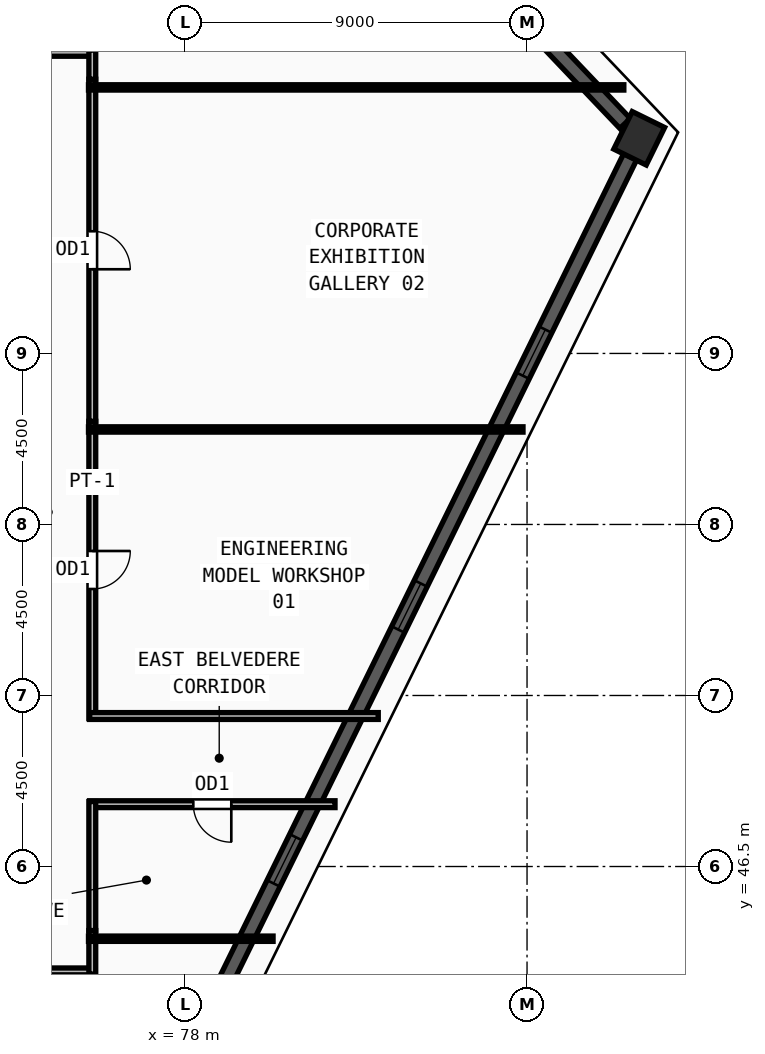
"""IFC4 building model, lengths in metres.
Left out: names, types, materials, properties, quantities, classifications, styles, units other than length and angle.
Written with IfcOpenShell. Run it as: python <this file> out.ifc"""

import sys

from ifc_helpers import new_model, si_unit, direction, frame, frame_2d, origin, origin_2d, place, context, subcontext, project, spatial, rectangle, extrude, source, transform, mapped, element, fill, save


model = new_model("IFC4")
c1 = context("Model", 3, precision=1e-05, world=origin(), true_north=direction((0.0, 1.0)))
c2 = subcontext(c1, "Body", "Model", "MODEL_VIEW")
j1 = project(units=[si_unit("LENGTHUNIT", "METRE"), si_unit("PLANEANGLEUNIT", "RADIAN")], contexts=[c1])
p1 = place(None, origin())
s1 = spatial("IfcSite", under=j1, at=p1, CompositionType="ELEMENT")
p2 = place(p1, origin())
s2 = spatial("IfcBuilding", under=s1, at=p2, CompositionType="ELEMENT")
p3 = place(p2, frame((0.0, 0.0, 309.0)))
s3 = spatial("IfcBuildingStorey", under=s2, at=p3, CompositionType="ELEMENT", Elevation=309.0)
m1 = source(origin(), c2, "Body", "SweptSolid", [
    extrude(rectangle(XDim=1.1, YDim=0.95, at=origin_2d()), origin(), (0.0, 0.0, 1.0), 3.75),
])
p4 = place(p3, frame((89.952, 65.661, 0.0), z_axis=(0.0, 0.0, 1.0), x_axis=(0.440566004113, 0.897720221461, 0.0)))
e1 = element("IfcColumn", 1, at=p4, inside=s3, PredefinedType="COLUMN", context=c2, shape_type="MappedRepresentation", body=[
    mapped(m1, transform((0.0, 0.0, 0.0), x_axis=(1.0, 0.0, 0.0), y_axis=(0.0, 1.0, 0.0), z_axis=(0.0, 0.0, 1.0), scale=1.0)),
])
p5 = place(p3, frame((78.098, 41.507, 0.0), z_axis=(0.0, 0.0, 1.0), x_axis=(0.440578765421, 0.897713958597, 0.0)))
e2 = element("IfcWall", 2, at=p5, inside=s3, PredefinedType="SOLIDWALL", context=c2, shape_type="SweptSolid", body=[
    extrude(rectangle(XDim=26.366, YDim=0.38, at=frame_2d((13.183, 0.0))), origin(), (0.0, 0.0, 1.0), 3.57),
])
m2 = source(origin(), c2, "Body", "SweptSolid", [
    extrude(rectangle(XDim=1.35, YDim=1.85, at=frame_2d((0.675, 0.925))), frame((0.0, 0.2, 0.0), z_axis=(0.0, -1.0, 0.0), x_axis=(1.0, 0.0, 0.0)), (0.0, 0.0, 1.0), 0.4),
])
p6 = place(p5, frame((5.066, 0.0, 0.55)))
e3 = element("IfcOpeningElement", 3, at=p6, cuts=e2, PredefinedType="OPENING", context=c2, shape_type="MappedRepresentation", body=[
    mapped(m2, transform((0.0, 0.0, 0.0), x_axis=(1.0, 0.0, 0.0), y_axis=(0.0, 1.0, 0.0), z_axis=(0.0, 0.0, 1.0), scale=1.0)),
])
p7 = place(p5, frame((12.508, 0.0, 0.55)))
e4 = element("IfcOpeningElement", 4, at=p7, cuts=e2, PredefinedType="OPENING", context=c2, shape_type="MappedRepresentation", body=[
    mapped(m2, transform((0.0, 0.0, 0.0), x_axis=(1.0, 0.0, 0.0), y_axis=(0.0, 1.0, 0.0), z_axis=(0.0, 0.0, 1.0), scale=1.0)),
])
p8 = place(p5, frame((19.949, 0.0, 0.55)))
e5 = element("IfcOpeningElement", 5, at=p8, cuts=e2, PredefinedType="OPENING", context=c2, shape_type="MappedRepresentation", body=[
    mapped(m2, transform((0.0, 0.0, 0.0), x_axis=(1.0, 0.0, 0.0), y_axis=(0.0, 1.0, 0.0), z_axis=(0.0, 0.0, 1.0), scale=1.0)),
])
p9 = place(p3, frame((89.58, 66.052, 0.0), z_axis=(0.0, 0.0, 1.0), x_axis=(-0.689378051653, 0.724401754484, 0.0)))
e6 = element("IfcWall", 6, at=p9, inside=s3, PredefinedType="SOLIDWALL", context=c2, shape_type="SweptSolid", body=[
    extrude(rectangle(XDim=3.938, YDim=0.38, at=frame_2d((1.969, 0.0))), origin(), (0.0, 0.0, 1.0), 3.57),
])
p10 = place(p3, frame((75.56, 58.215, 0.0), z_axis=(0.0, 0.0, 1.0), x_axis=(0.0, -1.0, 0.0)))
e7 = element("IfcWall", 7, at=p10, inside=s3, PredefinedType="PARTITIONING", context=c2, shape_type="SweptSolid", body=[
    extrude(rectangle(XDim=7.825, YDim=0.18, at=frame_2d((3.913, 0.0))), origin(), (0.0, 0.0, 1.0), 3.57),
])
m3 = source(origin(), c2, "Body", "SweptSolid", [
    extrude(rectangle(XDim=1.0, YDim=2.2, at=frame_2d((0.5, 1.1))), frame((0.0, 0.1, 0.0), z_axis=(0.0, -1.0, 0.0), x_axis=(1.0, 0.0, 0.0)), (0.0, 0.0, 1.0), 0.2),
])
p11 = place(p10, frame((3.413, 0.0, 0.0)))
e8 = element("IfcOpeningElement", 8, at=p11, cuts=e7, PredefinedType="OPENING", context=c2, shape_type="MappedRepresentation", body=[
    mapped(m3, transform((0.0, 0.0, 0.0), x_axis=(1.0, 0.0, 0.0), y_axis=(0.0, 1.0, 0.0), z_axis=(0.0, 0.0, 1.0), scale=1.0)),
])
p12 = place(p3, frame((75.56, 67.215, 0.0), z_axis=(0.0, 0.0, 1.0), x_axis=(0.0, -1.0, 0.0)))
e9 = element("IfcWall", 9, at=p12, inside=s3, PredefinedType="PARTITIONING", context=c2, shape_type="SweptSolid", body=[
    extrude(rectangle(XDim=9.0, YDim=0.18, at=frame_2d((4.5, 0.0))), origin(), (0.0, 0.0, 1.0), 3.57),
])
p13 = place(p12, frame((4.0, 0.0, 0.0)))
e10 = element("IfcOpeningElement", 10, at=p13, cuts=e9, PredefinedType="OPENING", context=c2, shape_type="MappedRepresentation", body=[
    mapped(m3, transform((0.0, 0.0, 0.0), x_axis=(1.0, 0.0, 0.0), y_axis=(0.0, 1.0, 0.0), z_axis=(0.0, 0.0, 1.0), scale=1.0)),
])
p14 = place(p3, frame((54.19, 67.91, 0.0), z_axis=(0.0, 0.0, 1.0), x_axis=(1.0, 0.0, 0.0)))
e11 = element("IfcWall", 11, at=p14, inside=s3, PredefinedType="PARTITIONING", context=c2, shape_type="SweptSolid", body=[
    extrude(rectangle(XDim=21.44, YDim=0.18, at=frame_2d((10.72, 0.0))), origin(), (0.0, 0.0, 1.0), 3.261),
])
m4 = source(origin(), c2, "Body", "SweptSolid", [
    extrude(rectangle(XDim=1.5, YDim=2.2, at=frame_2d((0.75, 1.1))), frame((0.0, 0.1, 0.0), z_axis=(0.0, -1.0, 0.0), x_axis=(1.0, 0.0, 0.0)), (0.0, 0.0, 1.0), 0.2),
])
p15 = place(p14, frame((9.97, 0.0, 0.0)))
e12 = element("IfcOpeningElement", 12, at=p15, cuts=e11, PredefinedType="OPENING", context=c2, shape_type="MappedRepresentation", body=[
    mapped(m4, transform((0.0, 0.0, 0.0), x_axis=(1.0, 0.0, 0.0), y_axis=(0.0, 1.0, 0.0), z_axis=(0.0, 0.0, 1.0), scale=1.0)),
])
p16 = place(p3, frame((75.63, 43.74, 0.0), z_axis=(0.0, 0.0, 1.0), x_axis=(-1.0, 0.0, 0.0)))
e13 = element("IfcWall", 13, at=p16, inside=s3, PredefinedType="PARTITIONING", context=c2, shape_type="SweptSolid", body=[
    extrude(rectangle(XDim=20.415, YDim=0.18, at=frame_2d((10.208, 0.0))), origin(), (0.0, 0.0, 1.0), 3.57),
])
p17 = place(p16, frame((9.457, 0.0, 0.0)))
e14 = element("IfcOpeningElement", 14, at=p17, cuts=e13, PredefinedType="OPENING", context=c2, shape_type="MappedRepresentation", body=[
    mapped(m4, transform((0.0, 0.0, 0.0), x_axis=(1.0, 0.0, 0.0), y_axis=(0.0, 1.0, 0.0), z_axis=(0.0, 0.0, 1.0), scale=1.0)),
])
p18 = place(p3, frame((81.947, 48.14, 0.0), z_axis=(0.0, 0.0, 1.0), x_axis=(-1.0, 0.0, 0.0)))
e15 = element("IfcWall", 15, at=p18, inside=s3, PredefinedType="PARTITIONING", context=c2, shape_type="SweptSolid", body=[
    extrude(rectangle(XDim=6.457, YDim=0.18, at=frame_2d((3.229, 0.0))), origin(), (0.0, 0.0, 1.0), 3.57),
])
p19 = place(p18, frame((2.729, 0.0, 0.0)))
e16 = element("IfcOpeningElement", 16, at=p19, cuts=e15, PredefinedType="OPENING", context=c2, shape_type="MappedRepresentation", body=[
    mapped(m3, transform((0.0, 0.0, 0.0), x_axis=(1.0, 0.0, 0.0), y_axis=(0.0, 1.0, 0.0), z_axis=(0.0, 0.0, 1.0), scale=1.0)),
])
p20 = place(p3, frame((75.49, 50.46, 0.0), z_axis=(0.0, 0.0, 1.0), x_axis=(1.0, 0.0, 0.0)))
e17 = element("IfcWall", 17, at=p20, inside=s3, PredefinedType="PARTITIONING", context=c2, shape_type="SweptSolid", body=[
    extrude(rectangle(XDim=7.595, YDim=0.18, at=frame_2d((3.797, 0.0))), origin(), (0.0, 0.0, 1.0), 3.57),
])
p21 = place(p3, frame((75.56, 67.98, 0.0), z_axis=(0.0, 0.0, 1.0), x_axis=(0.0, -1.0, 0.0)))
e18 = element("IfcWall", 18, at=p21, inside=s3, PredefinedType="PARTITIONING", context=c2, shape_type="SweptSolid", body=[
    extrude(rectangle(XDim=0.765, YDim=0.18, at=frame_2d((0.382, 0.0))), origin(), (0.0, 0.0, 1.0), 3.57),
])
p22 = place(p3, frame((75.56, 44.815, 0.0), z_axis=(0.0, 0.0, 1.0), x_axis=(0.0, -1.0, 0.0)))
e19 = element("IfcWall", 19, at=p22, inside=s3, PredefinedType="PARTITIONING", context=c2, shape_type="SweptSolid", body=[
    extrude(rectangle(XDim=1.145, YDim=0.18, at=frame_2d((0.573, 0.0))), origin(), (0.0, 0.0, 1.0), 3.57),
])
p23 = place(p3, frame((75.56, 48.21, 0.0), z_axis=(0.0, 0.0, 1.0), x_axis=(0.0, -1.0, 0.0)))
e20 = element("IfcWall", 20, at=p23, inside=s3, PredefinedType="PARTITIONING", context=c2, shape_type="SweptSolid", body=[
    extrude(rectangle(XDim=3.395, YDim=0.18, at=frame_2d((1.698, 0.0))), origin(), (0.0, 0.0, 1.0), 3.57),
])
p24 = place(p3, frame((75.46, 44.6, 0.0), z_axis=(0.0, 0.0, 1.0), x_axis=(1.0, 0.0, 0.0)))
e21 = element("IfcWall", 21, at=p24, inside=s3, PredefinedType="PARTITIONING", context=c2, shape_type="SweptSolid", body=[
    extrude(rectangle(XDim=4.857, YDim=0.14, at=frame_2d((2.428, 0.0))), origin(), (0.0, 0.0, 1.0), 3.57),
])
p25 = place(p3, frame((75.46, 58.0, 0.0), z_axis=(0.0, 0.0, 1.0), x_axis=(1.0, 0.0, 0.0)))
e22 = element("IfcWall", 22, at=p25, inside=s3, PredefinedType="PARTITIONING", context=c2, shape_type="SweptSolid", body=[
    extrude(rectangle(XDim=11.434, YDim=0.14, at=frame_2d((5.717, 0.0))), origin(), (0.0, 0.0, 1.0), 3.57),
])
p26 = place(p3, frame((75.46, 67.0, 0.0), z_axis=(0.0, 0.0, 1.0), x_axis=(1.0, 0.0, 0.0)))
e23 = element("IfcWall", 23, at=p26, inside=s3, PredefinedType="PARTITIONING", context=c2, shape_type="SweptSolid", body=[
    extrude(rectangle(XDim=14.087, YDim=0.14, at=frame_2d((7.043, 0.0))), origin(), (0.0, 0.0, 1.0), 3.261),
])
m5 = source(origin(), c2, "Body", "SweptSolid", [
    extrude(rectangle(XDim=1.35, YDim=1.85, at=frame_2d((0.675, 0.925))), frame((0.0, 0.03, 0.0), z_axis=(0.0, -1.0, 0.0), x_axis=(1.0, 0.0, 0.0)), (0.0, 0.0, 1.0), 0.06),
])
p27 = place(p6, origin())
e24 = element("IfcWindow", 24, at=p27, inside=s3, PartitioningType="SINGLE_PANEL", PredefinedType="WINDOW", context=c2, shape_type="MappedRepresentation", body=[
    mapped(m5, transform((0.0, 0.0, 0.0), x_axis=(1.0, 0.0, 0.0), y_axis=(0.0, 1.0, 0.0), z_axis=(0.0, 0.0, 1.0), scale=1.0)),
])
fill(e3, e24)
p28 = place(p7, origin())
e25 = element("IfcWindow", 25, at=p28, inside=s3, PartitioningType="SINGLE_PANEL", PredefinedType="WINDOW", context=c2, shape_type="MappedRepresentation", body=[
    mapped(m5, transform((0.0, 0.0, 0.0), x_axis=(1.0, 0.0, 0.0), y_axis=(0.0, 1.0, 0.0), z_axis=(0.0, 0.0, 1.0), scale=1.0)),
])
fill(e4, e25)
p29 = place(p8, origin())
e26 = element("IfcWindow", 26, at=p29, inside=s3, PartitioningType="SINGLE_PANEL", PredefinedType="WINDOW", context=c2, shape_type="MappedRepresentation", body=[
    mapped(m5, transform((0.0, 0.0, 0.0), x_axis=(1.0, 0.0, 0.0), y_axis=(0.0, 1.0, 0.0), z_axis=(0.0, 0.0, 1.0), scale=1.0)),
])
fill(e5, e26)
m6 = source(origin(), c2, "Body", "SweptSolid", [
    extrude(rectangle(XDim=1.0, YDim=2.2, at=frame_2d((0.5, 1.1))), frame((0.0, 0.025, 0.0), z_axis=(0.0, -1.0, 0.0), x_axis=(1.0, 0.0, 0.0)), (0.0, 0.0, 1.0), 0.05),
])
p30 = place(p11, origin())
e27 = element("IfcDoor", 27, at=p30, inside=s3, OperationType="SINGLE_SWING_LEFT", PredefinedType="DOOR", context=c2, shape_type="MappedRepresentation", body=[
    mapped(m6, transform((0.0, 0.0, 0.0), x_axis=(1.0, 0.0, 0.0), y_axis=(0.0, 1.0, 0.0), z_axis=(0.0, 0.0, 1.0), scale=1.0)),
])
fill(e8, e27)
p31 = place(p13, origin())
e28 = element("IfcDoor", 28, at=p31, inside=s3, OperationType="SINGLE_SWING_RIGHT", PredefinedType="DOOR", context=c2, shape_type="MappedRepresentation", body=[
    mapped(m6, transform((0.0, 0.0, 0.0), x_axis=(1.0, 0.0, 0.0), y_axis=(0.0, 1.0, 0.0), z_axis=(0.0, 0.0, 1.0), scale=1.0)),
])
fill(e10, e28)
p32 = place(p19, origin())
e29 = element("IfcDoor", 29, at=p32, inside=s3, OperationType="SINGLE_SWING_LEFT", PredefinedType="DOOR", context=c2, shape_type="MappedRepresentation", body=[
    mapped(m6, transform((0.0, 0.0, 0.0), x_axis=(1.0, 0.0, 0.0), y_axis=(0.0, 1.0, 0.0), z_axis=(0.0, 0.0, 1.0), scale=1.0)),
])
fill(e16, e29)
save(model, sys.argv[1])
